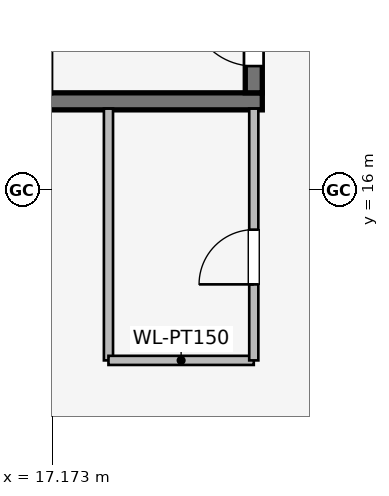
"""IFC4 building model, lengths in metres.
Left out: names, types, materials, properties, quantities, classifications, styles, units other than length and angle.
Written with IfcOpenShell. Run it as: python <this file> out.ifc"""

import sys

from ifc_helpers import new_model, si_unit, direction, frame, frame_2d, origin, place, context, subcontext, project, spatial, rectangle, extrude, element, fill, save


model = new_model("IFC4")
c1 = context("Model", 3, precision=1e-05, world=origin(), true_north=direction((0.0, 1.0)))
c2 = subcontext(c1, "Body", "Model", "MODEL_VIEW")
j1 = project(units=[si_unit("LENGTHUNIT", "METRE"), si_unit("PLANEANGLEUNIT", "RADIAN")], contexts=[c1])
p1 = place(None, origin())
s1 = spatial("IfcSite", under=j1, at=p1, CompositionType="ELEMENT")
p2 = place(p1, origin())
s2 = spatial("IfcBuilding", under=s1, at=p2, CompositionType="ELEMENT")
p3 = place(p2, frame((0.0, 0.0, 108.45)))
s3 = spatial("IfcBuildingStorey", under=s2, at=p3, CompositionType="ELEMENT", Elevation=108.45)
p4 = place(p3, frame((16.87, 17.46, 0.0), z_axis=(0.0, 0.0, 1.0), x_axis=(1.0, 0.0, 0.0)))
e1 = element("IfcWall", 1, at=p4, inside=s3, PredefinedType="SHEAR", context=c2, shape_type="SweptSolid", body=[
    extrude(rectangle(XDim=3.76, YDim=0.28, at=frame_2d((1.88, 0.0))), origin(), (0.0, 0.0, 1.0), 3.45),
])
p5 = place(p3, frame((20.49, 17.6, 0.0), z_axis=(0.0, 0.0, 1.0), x_axis=(0.0, 1.0, 0.0)))
e2 = element("IfcWall", 2, at=p5, inside=s3, PredefinedType="SHEAR", context=c2, shape_type="SweptSolid", body=[
    extrude(rectangle(XDim=7.8, YDim=0.28, at=frame_2d((3.9, 0.0))), origin(), (0.0, 0.0, 1.0), 3.45),
])
p6 = place(p5, frame((0.44, 0.0, 0.0)))
e3 = element("IfcOpeningElement", 3, at=p6, cuts=e2, PredefinedType="OPENING", context=c2, shape_type="SweptSolid", body=[
    extrude(rectangle(XDim=1.05, YDim=2.0, at=frame_2d((0.525, 1.0))), frame((0.0, 0.15, 0.0), z_axis=(0.0, -1.0, 0.0), x_axis=(1.0, 0.0, 0.0)), (0.0, 0.0, 1.0), 0.3),
])
p7 = place(p3, frame((17.243, 11.95, 0.0), z_axis=(0.0, 0.0, 1.0), x_axis=(-0.790621329885, 0.612305408053, 0.0)))
e4 = element("IfcWall", 4, at=p7, inside=s3, PredefinedType="STANDARD", context=c2, shape_type="SweptSolid", body=[
    extrude(rectangle(XDim=1.676, YDim=0.33, at=frame_2d((0.838, 0.0))), origin(), (0.0, 0.0, 1.0), 3.16),
])
p8 = place(p3, frame((18.1, 17.34, 0.0), z_axis=(0.0, 0.0, 1.0), x_axis=(0.0, -1.0, 0.0)))
e5 = element("IfcWall", 5, at=p8, inside=s3, PredefinedType="PARTITIONING", context=c2, shape_type="SweptSolid", body=[
    extrude(rectangle(XDim=4.14, YDim=0.15, at=frame_2d((2.07, 0.0))), origin(), (0.0, 0.0, 1.0), 3.16),
])
p9 = place(p3, frame((18.1, 13.2, 0.0), z_axis=(0.0, 0.0, 1.0), x_axis=(1.0, 0.0, 0.0)))
e6 = element("IfcWall", 6, at=p9, inside=s3, PredefinedType="PARTITIONING", context=c2, shape_type="SweptSolid", body=[
    extrude(rectangle(XDim=2.39, YDim=0.15, at=frame_2d((1.195, 0.0))), origin(), (0.0, 0.0, 1.0), 3.16),
])
p10 = place(p3, frame((20.49, 13.2, 0.0), z_axis=(0.0, 0.0, 1.0), x_axis=(0.0, 1.0, 0.0)))
e7 = element("IfcWall", 7, at=p10, inside=s3, PredefinedType="PARTITIONING", context=c2, shape_type="SweptSolid", body=[
    extrude(rectangle(XDim=4.14, YDim=0.15, at=frame_2d((2.07, 0.0))), origin(), (0.0, 0.0, 1.0), 3.16),
])
p11 = place(p10, frame((1.25, 0.0, 0.0)))
e8 = element("IfcOpeningElement", 8, at=p11, cuts=e7, PredefinedType="OPENING", context=c2, shape_type="SweptSolid", body=[
    extrude(rectangle(XDim=0.9, YDim=2.0, at=frame_2d((0.45, 1.0))), frame((0.0, 0.085, 0.0), z_axis=(0.0, -1.0, 0.0), x_axis=(1.0, 0.0, 0.0)), (0.0, 0.0, 1.0), 0.17),
])
p12 = place(p6, origin())
e9 = element("IfcDoor", 9, at=p12, inside=s3, OperationType="SINGLE_SWING_RIGHT", PredefinedType="DOOR", context=c2, shape_type="SweptSolid", body=[
    extrude(rectangle(XDim=1.05, YDim=2.0, at=frame_2d((0.525, 1.0))), frame((0.0, 0.025, 0.0), z_axis=(0.0, -1.0, 0.0), x_axis=(1.0, 0.0, 0.0)), (0.0, 0.0, 1.0), 0.05),
])
fill(e3, e9)
p13 = place(p11, origin())
e10 = element("IfcDoor", 10, at=p13, inside=s3, OperationType="SINGLE_SWING_LEFT", PredefinedType="DOOR", context=c2, shape_type="SweptSolid", body=[
    extrude(rectangle(XDim=0.9, YDim=2.0, at=frame_2d((0.45, 1.0))), frame((0.0, 0.025, 0.0), z_axis=(0.0, -1.0, 0.0), x_axis=(1.0, 0.0, 0.0)), (0.0, 0.0, 1.0), 0.05),
])
fill(e8, e10)
save(model, sys.argv[1])
